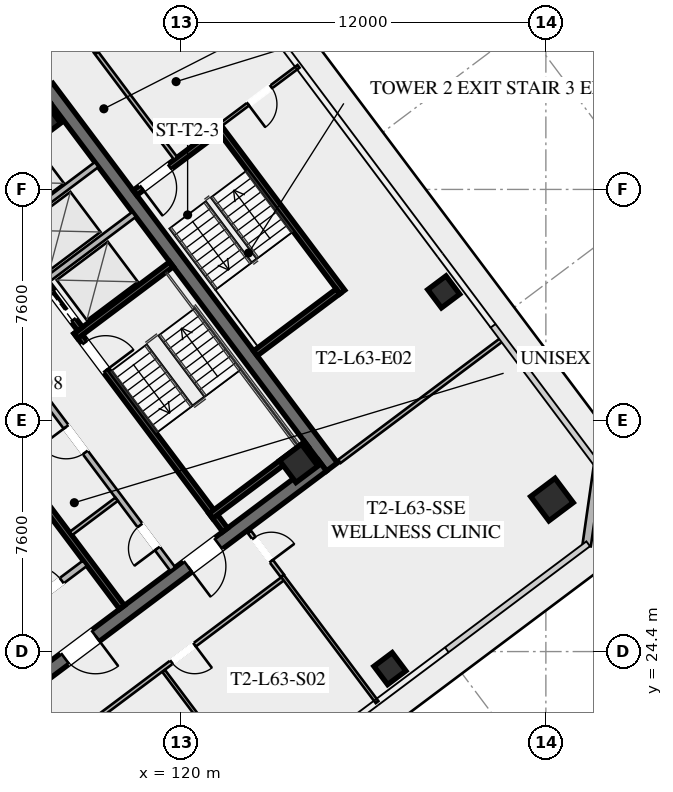
"""IFC4 building model, lengths in metres.
Left out: names, types, materials, properties, quantities, classifications, styles, units other than length and angle.
Written with IfcOpenShell. Run it as: python <this file> out.ifc"""

import sys

from ifc_helpers import new_model, si_unit, direction, frame, frame_2d, origin, origin_2d, place, context, subcontext, project, spatial, rectangle, hollow_rectangle, extrude, element, fill, save


model = new_model("IFC4")
c1 = context("Model", 3, precision=1e-05, world=origin(), true_north=direction((0.0, 1.0)))
c2 = subcontext(c1, "Body", "Model", "MODEL_VIEW")
j1 = project(units=[si_unit("LENGTHUNIT", "METRE"), si_unit("PLANEANGLEUNIT", "RADIAN")], contexts=[c1])
p1 = place(None, origin())
s1 = spatial("IfcSite", under=j1, at=p1, CompositionType="ELEMENT")
p2 = place(p1, origin())
s2 = spatial("IfcBuilding", under=s1, at=p2, CompositionType="ELEMENT")
p3 = place(p2, frame((0.0, 0.0, 232.6)))
s3 = spatial("IfcBuildingStorey", under=s2, at=p3, CompositionType="ELEMENT", Elevation=232.6)
p4 = place(p3, frame((115.604, 42.953, 0.0), z_axis=(0.0, 0.0, 1.0), x_axis=(0.600005007985, -0.799996243986, 0.0)))
e1 = element("IfcWall", 1, at=p4, inside=s3, PredefinedType="SHEAR", context=c2, shape_type="SweptSolid", body=[
    extrude(rectangle(XDim=15.6, YDim=0.45, at=frame_2d((7.8, 0.0))), origin(), (0.0, 0.0, 1.0), 3.55),
])
p5 = place(p3, frame((124.649, 30.518, 0.0), z_axis=(0.0, 0.0, 1.0), x_axis=(-0.8, -0.6, 0.0)))
e2 = element("IfcWall", 2, at=p5, inside=s3, PredefinedType="SHEAR", context=c2, shape_type="SweptSolid", body=[
    extrude(rectangle(XDim=15.26, YDim=0.45, at=frame_2d((7.63, 0.0))), origin(), (0.0, 0.0, 1.0), 3.55),
])
p6 = place(p5, frame((9.33, 0.0, 0.0)))
e3 = element("IfcOpeningElement", 3, at=p6, cuts=e2, PredefinedType="OPENING", context=c2, shape_type="SweptSolid", body=[
    extrude(rectangle(XDim=1.25, YDim=2.25, at=frame_2d((0.625, 1.125))), frame((0.0, 0.235, 0.0), z_axis=(0.0, -1.0, 0.0), x_axis=(1.0, 0.0, 0.0)), (0.0, 0.0, 1.0), 0.47),
])
p7 = place(p5, frame((4.28, 0.0, 0.0)))
e4 = element("IfcOpeningElement", 4, at=p7, cuts=e2, PredefinedType="OPENING", context=c2, shape_type="SweptSolid", body=[
    extrude(rectangle(XDim=1.25, YDim=2.25, at=frame_2d((0.625, 1.125))), frame((0.0, 0.235, 0.0), z_axis=(0.0, -1.0, 0.0), x_axis=(1.0, 0.0, 0.0)), (0.0, 0.0, 1.0), 0.47),
])
for number, where, z_axis, x_axis in (
    (5, (123.87, 30.59, 0.0), (0.0, 0.0, 1.0), (0.8, 0.6, 0.0)),
    (6, (115.41, 41.87, 0.0), (0.0, 0.0, 1.0), (0.8, 0.6, 0.0)),
):
    element("IfcColumn", number, at=place(p3, frame(where, z_axis=z_axis, x_axis=x_axis)), inside=s3, PredefinedType="COLUMN", context=c2, shape_type="SweptSolid", body=[
        extrude(hollow_rectangle(XDim=0.9, YDim=0.9, WallThickness=0.04, at=origin_2d()), origin(), (0.0, 0.0, 1.0), 3.37),
    ])
p8 = place(p3, frame((132.2, 29.4, -0.175), z_axis=(0.0, 0.0, 1.0), x_axis=(0.799999996291, 0.600000004945, 0.0)))
e7 = element("IfcColumn", 7, at=p8, inside=s3, PredefinedType="COLUMN", context=c2, shape_type="SweptSolid", body=[
    extrude(hollow_rectangle(XDim=1.0, YDim=1.0, WallThickness=0.04, at=origin_2d()), origin(), (0.0, 0.0, 1.0), 3.545),
])
for number, where, z_axis, x_axis in (
    (8, (126.87, 23.84, -0.175), (0.0, 0.0, 1.0), (0.8, 0.6, 0.0)),
    (9, (128.64, 36.23, -0.175), (0.0, 0.0, 1.0), (0.8, 0.6, 0.0)),
):
    element("IfcColumn", number, at=place(p3, frame(where, z_axis=z_axis, x_axis=x_axis)), inside=s3, PredefinedType="COLUMN", context=c2, shape_type="SweptSolid", body=[
        extrude(hollow_rectangle(XDim=0.75, YDim=0.75, WallThickness=0.032, at=origin_2d()), origin(), (0.0, 0.0, 1.0), 3.545),
    ])
p9 = place(p3, frame((133.72, 30.54, 0.0), z_axis=(0.0, 0.0, 1.0), x_axis=(-0.141370477216, -0.989956760759, 0.0)))
e10 = element("IfcWall", 10, at=p9, inside=s3, PredefinedType="SOLIDWALL", context=c2, shape_type="SweptSolid", body=[
    extrude(rectangle(XDim=2.687, YDim=0.28, at=frame_2d((1.344, 0.0))), origin(), (0.0, 0.0, 1.0), 3.37),
])
p10 = place(p3, frame((116.56, 34.92, 0.0), z_axis=(0.0, 0.0, 1.0), x_axis=(0.59999041401, -0.800007189403, 0.0)))
e11 = element("IfcWall", 11, at=p10, inside=s3, PredefinedType="SHEAR", context=c2, shape_type="SweptSolid", body=[
    extrude(rectangle(XDim=8.15, YDim=0.2, at=frame_2d((4.075, 0.0))), origin(), (0.0, 0.0, 1.0), 3.37),
])
p11 = place(p10, frame((0.45, 0.0, 0.0)))
e12 = element("IfcOpeningElement", 12, at=p11, cuts=e11, PredefinedType="OPENING", context=c2, shape_type="SweptSolid", body=[
    extrude(rectangle(XDim=1.15, YDim=2.2, at=frame_2d((0.575, 1.1))), frame((0.0, 0.11, 0.0), z_axis=(0.0, -1.0, 0.0), x_axis=(1.0, 0.0, 0.0)), (0.0, 0.0, 1.0), 0.22),
])
for number, where, z_axis, x_axis in (
    (13, (116.54, 34.78, 0.0), (0.0, 0.0, 1.0), (0.8, 0.6, 0.0)),
    (14, (120.98, 28.86, 0.0), (0.0, 0.0, 1.0), (0.8, 0.6, 0.0)),
):
    element("IfcWall", number, at=place(p3, frame(where, z_axis=z_axis, x_axis=x_axis)), inside=s3, PredefinedType="SHEAR", context=c2, shape_type="SweptSolid", body=[
        extrude(rectangle(XDim=3.93, YDim=0.2, at=frame_2d((1.965, 0.0))), origin(), (0.0, 0.0, 1.0), 3.37),
    ])
p12 = place(p3, frame((118.058, 25.856, 0.0), z_axis=(0.0, 0.0, 1.0), x_axis=(-0.600002657301, 0.799998007018, 0.0)))
e15 = element("IfcWall", 15, at=p12, inside=s3, PredefinedType="SHEAR", context=c2, shape_type="SweptSolid", body=[
    extrude(rectangle(XDim=14.7, YDim=0.2, at=frame_2d((7.35, 0.0))), origin(), (0.0, 0.0, 1.0), 3.37),
])
p13 = place(p3, frame((114.316, 25.412, 0.0), z_axis=(0.0, 0.0, 1.0), x_axis=(0.800018601094, 0.59997519774, 0.0)))
e16 = element("IfcWall", 16, at=p13, inside=s3, PredefinedType="SOLIDWALL", context=c2, shape_type="SweptSolid", body=[
    extrude(rectangle(XDim=3.15, YDim=0.22, at=frame_2d((1.575, 0.0))), origin(), (0.0, 0.0, 1.0), 2.723),
])
p14 = place(p13, frame((0.95, 0.0, 0.0)))
e17 = element("IfcOpeningElement", 17, at=p14, cuts=e16, PredefinedType="OPENING", context=c2, shape_type="SweptSolid", body=[
    extrude(rectangle(XDim=1.25, YDim=2.25, at=frame_2d((0.625, 1.125))), frame((0.0, 0.12, 0.0), z_axis=(0.0, -1.0, 0.0), x_axis=(1.0, 0.0, 0.0)), (0.0, 0.0, 1.0), 0.24),
])
p15 = place(p3, frame((112.75, 40.25, 0.0), z_axis=(0.0, 0.0, 1.0), x_axis=(0.599994036198, -0.800004472816, 0.0)))
e18 = element("IfcWall", 18, at=p15, inside=s3, PredefinedType="SHEAR", context=c2, shape_type="SweptSolid", body=[
    extrude(rectangle(XDim=6.55, YDim=0.2, at=frame_2d((3.275, 0.0))), origin(), (0.0, 0.0, 1.0), 3.37),
])
p16 = place(p15, frame((5.075, 0.0, 0.0)))
e19 = element("IfcOpeningElement", 19, at=p16, cuts=e18, PredefinedType="OPENING", context=c2, shape_type="SweptSolid", body=[
    extrude(rectangle(XDim=1.1, YDim=2.2, at=frame_2d((0.55, 1.1))), frame((0.0, 0.11, 0.0), z_axis=(0.0, -1.0, 0.0), x_axis=(1.0, 0.0, 0.0)), (0.0, 0.0, 1.0), 0.22),
])
p17 = place(p15, frame((3.025, 0.0, 0.0)))
e20 = element("IfcOpeningElement", 20, at=p17, cuts=e18, PredefinedType="OPENING", context=c2, shape_type="SweptSolid", body=[
    extrude(rectangle(XDim=1.1, YDim=2.2, at=frame_2d((0.55, 1.1))), frame((0.0, 0.11, 0.0), z_axis=(0.0, -1.0, 0.0), x_axis=(1.0, 0.0, 0.0)), (0.0, 0.0, 1.0), 0.22),
])
p18 = place(p15, frame((1.025, 0.0, 0.0)))
e21 = element("IfcOpeningElement", 21, at=p18, cuts=e18, PredefinedType="OPENING", context=c2, shape_type="SweptSolid", body=[
    extrude(rectangle(XDim=1.1, YDim=2.2, at=frame_2d((0.55, 1.1))), frame((0.0, 0.11, 0.0), z_axis=(0.0, -1.0, 0.0), x_axis=(1.0, 0.0, 0.0)), (0.0, 0.0, 1.0), 0.22),
])
for number, where, z_axis, x_axis in (
    (22, (115.59, 36.63, 0.0), (0.0, 0.0, 1.0), (0.8, 0.6, 0.0)),
    (23, (114.36, 38.27, 0.0), (0.0, 0.0, 1.0), (0.8, 0.6, 0.0)),
):
    element("IfcWall", number, at=place(p3, frame(where, z_axis=z_axis, x_axis=x_axis)), inside=s3, PredefinedType="SOLIDWALL", context=c2, shape_type="SweptSolid", body=[
        extrude(rectangle(XDim=3.58, YDim=0.2, at=frame_2d((1.79, 0.0))), origin(), (0.0, 0.0, 1.0), 3.37),
    ])
p19 = place(p3, frame((119.73, 27.11, 0.0), z_axis=(0.0, 0.0, 1.0), x_axis=(-0.600005580459, 0.799995814625, 0.0)))
e24 = element("IfcWall", 24, at=p19, inside=s3, PredefinedType="SOLIDWALL", context=c2, shape_type="SweptSolid", body=[
    extrude(rectangle(XDim=7.0, YDim=0.2, at=frame_2d((3.5, 0.0))), origin(), (0.0, 0.0, 1.0), 2.723),
])
p20 = place(p19, frame((0.85, 0.0, 0.0)))
e25 = element("IfcOpeningElement", 25, at=p20, cuts=e24, PredefinedType="OPENING", context=c2, shape_type="SweptSolid", body=[
    extrude(rectangle(XDim=0.95, YDim=2.05, at=frame_2d((0.475, 1.025))), frame((0.0, 0.11, 0.0), z_axis=(0.0, -1.0, 0.0), x_axis=(1.0, 0.0, 0.0)), (0.0, 0.0, 1.0), 0.22),
])
p21 = place(p19, frame((4.8, 0.0, 0.0)))
e26 = element("IfcOpeningElement", 26, at=p21, cuts=e24, PredefinedType="OPENING", context=c2, shape_type="SweptSolid", body=[
    extrude(rectangle(XDim=1.05, YDim=2.2, at=frame_2d((0.525, 1.1))), frame((0.0, 0.11, 0.0), z_axis=(0.0, -1.0, 0.0), x_axis=(1.0, 0.0, 0.0)), (0.0, 0.0, 1.0), 0.22),
])
p22 = place(p3, frame((116.376, 28.282, 0.0), z_axis=(0.0, 0.0, 1.0), x_axis=(0.8, 0.6, 0.0)))
e27 = element("IfcWall", 27, at=p22, inside=s3, PredefinedType="PARTITIONING", context=c2, shape_type="SweptSolid", body=[
    extrude(rectangle(XDim=1.88, YDim=0.135, at=frame_2d((0.94, 0.0))), origin(), (0.0, 0.0, 1.0), 2.723),
])
p23 = place(p3, frame((125.304, 36.228, 0.0), z_axis=(0.0, 0.0, 1.0), x_axis=(-0.59998851072, 0.800008616831, 0.0)))
e28 = element("IfcWall", 28, at=p23, inside=s3, PredefinedType="SHEAR", context=c2, shape_type="SweptSolid", body=[
    extrude(rectangle(XDim=6.8, YDim=0.2, at=frame_2d((3.4, 0.0))), origin(), (0.0, 0.0, 1.0), 3.37),
])
p24 = place(p3, frame((121.204, 41.528, 0.0), z_axis=(0.0, 0.0, 1.0), x_axis=(-0.800017232136, -0.599977023131, 0.0)))
e29 = element("IfcWall", 29, at=p24, inside=s3, PredefinedType="SHEAR", context=c2, shape_type="SweptSolid", body=[
    extrude(rectangle(XDim=3.4, YDim=0.2, at=frame_2d((1.7, 0.0))), origin(), (0.0, 0.0, 1.0), 3.37),
])
p25 = place(p24, frame((1.975, 0.0, 0.0)))
e30 = element("IfcOpeningElement", 30, at=p25, cuts=e29, PredefinedType="OPENING", context=c2, shape_type="SweptSolid", body=[
    extrude(rectangle(XDim=1.15, YDim=2.2, at=frame_2d((0.575, 1.1))), frame((0.0, 0.11, 0.0), z_axis=(0.0, -1.0, 0.0), x_axis=(1.0, 0.0, 0.0)), (0.0, 0.0, 1.0), 0.22),
])
p26 = place(p3, frame((122.444, 34.208, 0.0), z_axis=(0.0, 0.0, 1.0), x_axis=(0.79999138319, 0.600011488909, 0.0)))
e31 = element("IfcWall", 31, at=p26, inside=s3, PredefinedType="SHEAR", context=c2, shape_type="SweptSolid", body=[
    extrude(rectangle(XDim=3.4, YDim=0.2, at=frame_2d((1.7, 0.0))), origin(), (0.0, 0.0, 1.0), 3.37),
])
p27 = place(p3, frame((119.824, 40.618, 0.0), z_axis=(0.0, 0.0, 1.0), x_axis=(-0.599982243973, 0.800013316712, 0.0)))
e32 = element("IfcWall", 32, at=p27, inside=s3, PredefinedType="PARTITIONING", context=c2, shape_type="SweptSolid", body=[
    extrude(rectangle(XDim=4.4, YDim=0.135, at=frame_2d((2.2, 0.0))), origin(), (0.0, 0.0, 1.0), 2.723),
])
p28 = place(p3, frame((99.736, 35.052, 0.0), z_axis=(0.0, 0.0, 1.0), x_axis=(0.799997387685, 0.600003483071, 0.0)))
e33 = element("IfcWall", 33, at=p28, inside=s3, PredefinedType="PARTITIONING", context=c2, shape_type="SweptSolid", body=[
    extrude(rectangle(XDim=22.43, YDim=0.135, at=frame_2d((11.215, 0.0))), origin(), (0.0, 0.0, 1.0), 2.723),
])
p29 = place(p28, frame((0.3, 0.0, 0.0)))
e34 = element("IfcOpeningElement", 34, at=p29, cuts=e33, PredefinedType="OPENING", context=c2, shape_type="SweptSolid", body=[
    extrude(rectangle(XDim=0.95, YDim=2.05, at=frame_2d((0.475, 1.025))), frame((0.0, 0.077, 0.0), z_axis=(0.0, -1.0, 0.0), x_axis=(1.0, 0.0, 0.0)), (0.0, 0.0, 1.0), 0.155),
])
p30 = place(p28, frame((9.423, 0.0, 0.0)))
e35 = element("IfcOpeningElement", 35, at=p30, cuts=e33, PredefinedType="OPENING", context=c2, shape_type="SweptSolid", body=[
    extrude(rectangle(XDim=0.95, YDim=2.05, at=frame_2d((0.475, 1.025))), frame((0.0, 0.077, 0.0), z_axis=(0.0, -1.0, 0.0), x_axis=(1.0, 0.0, 0.0)), (0.0, 0.0, 1.0), 0.155),
])
p31 = place(p28, frame((21.18, 0.0, 0.0)))
e36 = element("IfcOpeningElement", 36, at=p31, cuts=e33, PredefinedType="OPENING", context=c2, shape_type="SweptSolid", body=[
    extrude(rectangle(XDim=0.95, YDim=2.05, at=frame_2d((0.475, 1.025))), frame((0.0, 0.077, 0.0), z_axis=(0.0, -1.0, 0.0), x_axis=(1.0, 0.0, 0.0)), (0.0, 0.0, 1.0), 0.155),
])
p32 = place(p3, frame((123.382, 26.824, 0.0), z_axis=(0.0, 0.0, 1.0), x_axis=(-0.800004191227, -0.599994411657, 0.0)))
e37 = element("IfcWall", 37, at=p32, inside=s3, PredefinedType="PARTITIONING", context=c2, shape_type="SweptSolid", body=[
    extrude(rectangle(XDim=13.98, YDim=0.135, at=frame_2d((6.99, 0.0))), origin(), (0.0, 0.0, 1.0), 2.723),
])
p33 = place(p32, frame((7.887, 0.0, 0.0)))
e38 = element("IfcOpeningElement", 38, at=p33, cuts=e37, PredefinedType="OPENING", context=c2, shape_type="SweptSolid", body=[
    extrude(rectangle(XDim=0.95, YDim=2.05, at=frame_2d((0.475, 1.025))), frame((0.0, 0.077, 0.0), z_axis=(0.0, -1.0, 0.0), x_axis=(1.0, 0.0, 0.0)), (0.0, 0.0, 1.0), 0.155),
])
p34 = place(p32, frame((3.67, 0.0, 0.0)))
e39 = element("IfcOpeningElement", 39, at=p34, cuts=e37, PredefinedType="OPENING", context=c2, shape_type="SweptSolid", body=[
    extrude(rectangle(XDim=0.95, YDim=2.05, at=frame_2d((0.475, 1.025))), frame((0.0, 0.077, 0.0), z_axis=(0.0, -1.0, 0.0), x_axis=(1.0, 0.0, 0.0)), (0.0, 0.0, 1.0), 0.155),
])
p35 = place(p3, frame((122.248, 28.336, 0.0), z_axis=(0.0, 0.0, 1.0), x_axis=(0.599978417824, -0.800016186177, 0.0)))
e40 = element("IfcWall", 40, at=p35, inside=s3, PredefinedType="PARTITIONING", context=c2, shape_type="SweptSolid", body=[
    extrude(rectangle(XDim=1.81, YDim=0.135, at=frame_2d((0.905, 0.0))), origin(), (0.0, 0.0, 1.0), 2.723),
])
p36 = place(p35, frame((0.25, 0.0, 0.0)))
e41 = element("IfcOpeningElement", 41, at=p36, cuts=e40, PredefinedType="OPENING", context=c2, shape_type="SweptSolid", body=[
    extrude(rectangle(XDim=0.95, YDim=2.05, at=frame_2d((0.475, 1.025))), frame((0.0, 0.077, 0.0), z_axis=(0.0, -1.0, 0.0), x_axis=(1.0, 0.0, 0.0)), (0.0, 0.0, 1.0), 0.155),
])
p37 = place(p3, frame((122.448, 19.736, 0.0), z_axis=(0.0, 0.0, 1.0), x_axis=(-0.600015531756, 0.799988350947, 0.0)))
e42 = element("IfcWall", 42, at=p37, inside=s3, PredefinedType="PARTITIONING", context=c2, shape_type="SweptSolid", body=[
    extrude(rectangle(XDim=5.03, YDim=0.11, at=frame_2d((2.515, 0.0))), origin(), (0.0, 0.0, 1.0), 2.723),
])
p38 = place(p3, frame((126.448, 22.736, 0.0), z_axis=(0.0, 0.0, 1.0), x_axis=(-0.600015053192, 0.799988709885, 0.0)))
e43 = element("IfcWall", 43, at=p38, inside=s3, PredefinedType="PARTITIONING", context=c2, shape_type="SweptSolid", body=[
    extrude(rectangle(XDim=5.19, YDim=0.11, at=frame_2d((2.595, 0.0))), origin(), (0.0, 0.0, 1.0), 2.723),
])
p39 = place(p3, frame((121.224, 47.168, 0.0), z_axis=(0.0, 0.0, 1.0), x_axis=(-0.8, -0.6, 0.0)))
e44 = element("IfcWall", 44, at=p39, inside=s3, PredefinedType="PARTITIONING", context=c2, shape_type="SweptSolid", body=[
    extrude(rectangle(XDim=5.05, YDim=0.135, at=frame_2d((2.525, 0.0))), origin(), (0.0, 0.0, 1.0), 2.723),
])
p40 = place(p39, frame((2.4, 0.0, 0.0)))
e45 = element("IfcOpeningElement", 45, at=p40, cuts=e44, PredefinedType="OPENING", context=c2, shape_type="SweptSolid", body=[
    extrude(rectangle(XDim=0.95, YDim=2.05, at=frame_2d((0.475, 1.025))), frame((0.0, 0.077, 0.0), z_axis=(0.0, -1.0, 0.0), x_axis=(1.0, 0.0, 0.0)), (0.0, 0.0, 1.0), 0.155),
])
p41 = place(p3, frame((125.208, 30.656, 0.0), z_axis=(0.0, 0.0, 1.0), x_axis=(0.8, 0.6, 0.0)))
e46 = element("IfcWall", 46, at=p41, inside=s3, PredefinedType="PARTITIONING", context=c2, shape_type="SweptSolid", body=[
    extrude(rectangle(XDim=6.72, YDim=0.135, at=frame_2d((3.36, 0.0))), origin(), (0.0, 0.0, 1.0), 2.723),
])
p42 = place(p3, frame((123.864, 43.648, 0.0), z_axis=(0.0, 0.0, 1.0), x_axis=(-0.800018310174, -0.599975585658, 0.0)))
e47 = element("IfcWall", 47, at=p42, inside=s3, PredefinedType="PARTITIONING", context=c2, shape_type="SweptSolid", body=[
    extrude(rectangle(XDim=3.2, YDim=0.11, at=frame_2d((1.6, 0.0))), origin(), (0.0, 0.0, 1.0), 2.723),
])
p43 = place(p42, frame((1.125, 0.0, 0.0)))
e48 = element("IfcOpeningElement", 48, at=p43, cuts=e47, PredefinedType="OPENING", context=c2, shape_type="SweptSolid", body=[
    extrude(rectangle(XDim=0.95, YDim=2.05, at=frame_2d((0.475, 1.025))), frame((0.0, 0.065, 0.0), z_axis=(0.0, -1.0, 0.0), x_axis=(1.0, 0.0, 0.0)), (0.0, 0.0, 1.0), 0.13),
])
p44 = place(p6, origin())
e49 = element("IfcDoor", 49, at=p44, inside=s3, OperationType="SINGLE_SWING_LEFT", PredefinedType="DOOR", context=c2, shape_type="SweptSolid", body=[
    extrude(rectangle(XDim=1.25, YDim=2.25, at=frame_2d((0.625, 1.125))), frame((0.0, 0.025, 0.0), z_axis=(0.0, -1.0, 0.0), x_axis=(1.0, 0.0, 0.0)), (0.0, 0.0, 1.0), 0.05),
])
fill(e3, e49)
p45 = place(p7, origin())
e50 = element("IfcDoor", 50, at=p45, inside=s3, OperationType="SINGLE_SWING_RIGHT", PredefinedType="DOOR", context=c2, shape_type="SweptSolid", body=[
    extrude(rectangle(XDim=1.25, YDim=2.25, at=frame_2d((0.625, 1.125))), frame((0.0, 0.025, 0.0), z_axis=(0.0, -1.0, 0.0), x_axis=(1.0, 0.0, 0.0)), (0.0, 0.0, 1.0), 0.05),
])
fill(e4, e50)
p46 = place(p11, origin())
e51 = element("IfcDoor", 51, at=p46, inside=s3, OperationType="SINGLE_SWING_RIGHT", PredefinedType="DOOR", context=c2, shape_type="SweptSolid", body=[
    extrude(rectangle(XDim=1.15, YDim=2.2, at=frame_2d((0.575, 1.1))), frame((0.0, 0.025, 0.0), z_axis=(0.0, -1.0, 0.0), x_axis=(1.0, 0.0, 0.0)), (0.0, 0.0, 1.0), 0.05),
])
fill(e12, e51)
p47 = place(p14, origin())
e52 = element("IfcDoor", 52, at=p47, inside=s3, OperationType="SINGLE_SWING_LEFT", PredefinedType="DOOR", context=c2, shape_type="SweptSolid", body=[
    extrude(rectangle(XDim=1.25, YDim=2.25, at=frame_2d((0.625, 1.125))), frame((0.0, 0.025, 0.0), z_axis=(0.0, -1.0, 0.0), x_axis=(1.0, 0.0, 0.0)), (0.0, 0.0, 1.0), 0.05),
])
fill(e17, e52)
p48 = place(p20, origin())
e53 = element("IfcDoor", 53, at=p48, inside=s3, OperationType="SINGLE_SWING_LEFT", PredefinedType="DOOR", context=c2, shape_type="SweptSolid", body=[
    extrude(rectangle(XDim=0.95, YDim=2.05, at=frame_2d((0.475, 1.025))), frame((0.0, 0.025, 0.0), z_axis=(0.0, -1.0, 0.0), x_axis=(1.0, 0.0, 0.0)), (0.0, 0.0, 1.0), 0.05),
])
fill(e25, e53)
p49 = place(p21, origin())
e54 = element("IfcDoor", 54, at=p49, inside=s3, OperationType="SINGLE_SWING_RIGHT", PredefinedType="DOOR", context=c2, shape_type="SweptSolid", body=[
    extrude(rectangle(XDim=1.05, YDim=2.2, at=frame_2d((0.525, 1.1))), frame((0.0, 0.025, 0.0), z_axis=(0.0, -1.0, 0.0), x_axis=(1.0, 0.0, 0.0)), (0.0, 0.0, 1.0), 0.05),
])
fill(e26, e54)
p50 = place(p25, origin())
e55 = element("IfcDoor", 55, at=p50, inside=s3, OperationType="SINGLE_SWING_RIGHT", PredefinedType="DOOR", context=c2, shape_type="SweptSolid", body=[
    extrude(rectangle(XDim=1.15, YDim=2.2, at=frame_2d((0.575, 1.1))), frame((0.0, 0.025, 0.0), z_axis=(0.0, -1.0, 0.0), x_axis=(1.0, 0.0, 0.0)), (0.0, 0.0, 1.0), 0.05),
])
fill(e30, e55)
p51 = place(p34, origin())
e56 = element("IfcDoor", 56, at=p51, inside=s3, OperationType="SINGLE_SWING_LEFT", PredefinedType="DOOR", context=c2, shape_type="SweptSolid", body=[
    extrude(rectangle(XDim=0.95, YDim=2.05, at=frame_2d((0.475, 1.025))), frame((0.0, 0.025, 0.0), z_axis=(0.0, -1.0, 0.0), x_axis=(1.0, 0.0, 0.0)), (0.0, 0.0, 1.0), 0.05),
])
fill(e39, e56)
p52 = place(p36, origin())
e57 = element("IfcDoor", 57, at=p52, inside=s3, OperationType="SINGLE_SWING_RIGHT", PredefinedType="DOOR", context=c2, shape_type="SweptSolid", body=[
    extrude(rectangle(XDim=0.95, YDim=2.05, at=frame_2d((0.475, 1.025))), frame((0.0, 0.025, 0.0), z_axis=(0.0, -1.0, 0.0), x_axis=(1.0, 0.0, 0.0)), (0.0, 0.0, 1.0), 0.05),
])
fill(e41, e57)
p53 = place(p43, origin())
e58 = element("IfcDoor", 58, at=p53, inside=s3, OperationType="SINGLE_SWING_RIGHT", PredefinedType="DOOR", context=c2, shape_type="SweptSolid", body=[
    extrude(rectangle(XDim=0.95, YDim=2.05, at=frame_2d((0.475, 1.025))), frame((0.0, 0.025, 0.0), z_axis=(0.0, -1.0, 0.0), x_axis=(1.0, 0.0, 0.0)), (0.0, 0.0, 1.0), 0.05),
])
fill(e48, e58)
p54 = place(p16, origin())
e59 = element("IfcDoor", 59, at=p54, inside=s3, OperationType="SLIDING_TO_LEFT", PredefinedType="DOOR", context=c2, shape_type="SweptSolid", body=[
    extrude(rectangle(XDim=1.1, YDim=2.2, at=frame_2d((0.55, 1.1))), frame((0.0, 0.025, 0.0), z_axis=(0.0, -1.0, 0.0), x_axis=(1.0, 0.0, 0.0)), (0.0, 0.0, 1.0), 0.05),
])
fill(e19, e59)
save(model, sys.argv[1])
